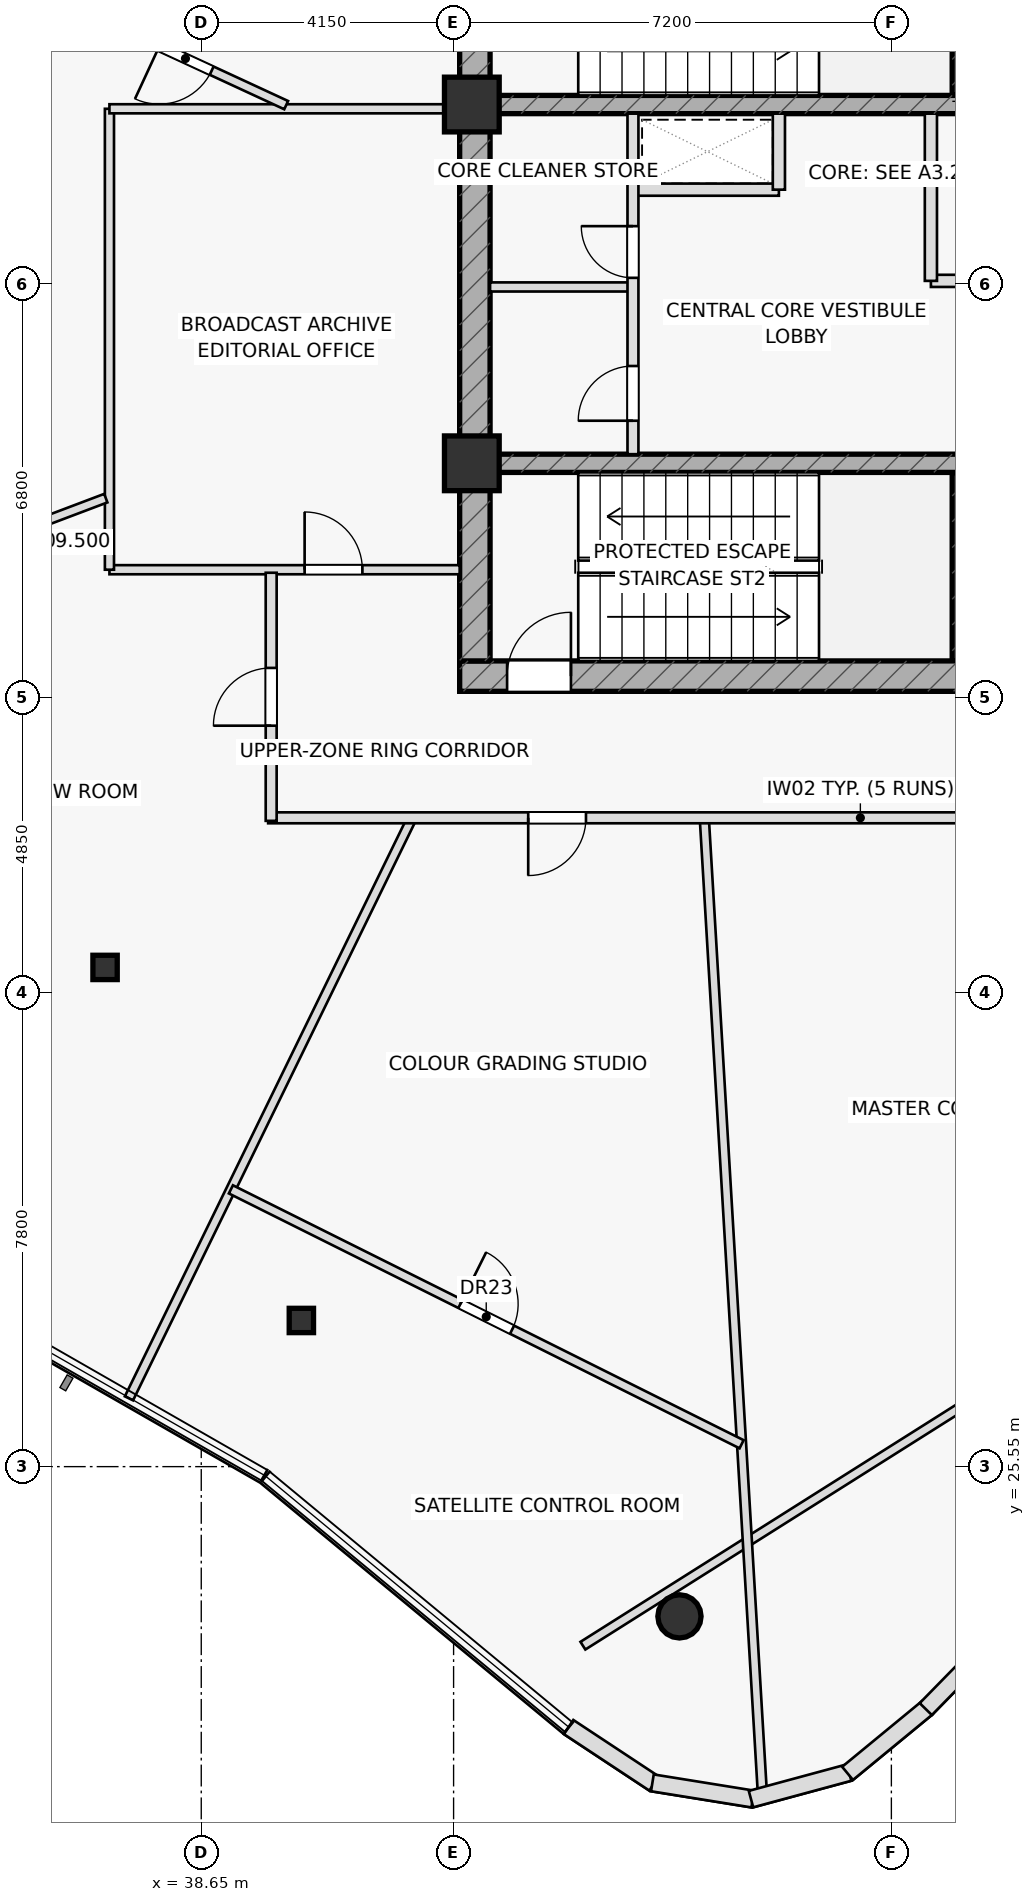
"""IFC4 building model, lengths in metres.
Left out: names, types, materials, properties, quantities, classifications, styles, units other than length and angle.
Written with IfcOpenShell. Run it as: python <this file> out.ifc"""

import sys

from ifc_helpers import new_model, si_unit, direction, frame, frame_2d, origin, origin_2d, place, context, subcontext, project, spatial, rectangle, hollow_rectangle, hollow_circle, extrude, element, fill, save


model = new_model("IFC4")
c1 = context("Model", 3, precision=1e-05, world=origin(), true_north=direction((0.0, 1.0)))
c2 = subcontext(c1, "Body", "Model", "MODEL_VIEW")
j1 = project(units=[si_unit("LENGTHUNIT", "METRE"), si_unit("PLANEANGLEUNIT", "RADIAN")], contexts=[c1])
p1 = place(None, origin())
s1 = spatial("IfcSite", under=j1, at=p1, CompositionType="ELEMENT")
p2 = place(p1, origin())
s2 = spatial("IfcBuilding", under=s1, at=p2, CompositionType="ELEMENT")
p3 = place(p2, frame((0.0, 0.0, 309.5)))
s3 = spatial("IfcBuildingStorey", under=s2, at=p3, CompositionType="ELEMENT", Elevation=309.5)
for number, where, z_axis, x_axis in (
    (1, (51.11, 48.1, 0.0), (0.0, 0.0, 1.0), (0.0, 1.0, 0.0)),
    (2, (51.11, 38.8, 0.0), (0.0, 0.0, 1.0), (0.0, 1.0, 0.0)),
):
    element("IfcWall", number, at=place(p3, frame(where, z_axis=z_axis, x_axis=x_axis)), inside=s3, PredefinedType="SHEAR", context=c2, shape_type="SweptSolid", body=[
        extrude(rectangle(XDim=3.1, YDim=0.22, at=frame_2d((1.55, 0.0))), origin(), (0.0, 0.0, 1.0), 3.7),
    ])
p4 = place(p3, frame((42.9, 38.55, 0.0), z_axis=(0.0, 0.0, 1.0), x_axis=(1.0, 0.0, 0.0)))
e3 = element("IfcWall", 3, at=p4, inside=s3, PredefinedType="SHEAR", context=c2, shape_type="SweptSolid", body=[
    extrude(rectangle(XDim=14.2, YDim=0.5, at=frame_2d((7.1, 0.0))), origin(), (0.0, 0.0, 1.0), 3.7),
])
p5 = place(p4, frame((0.78, 0.0, 0.0)))
e4 = element("IfcOpeningElement", 4, at=p5, cuts=e3, PredefinedType="OPENING", context=c2, shape_type="SweptSolid", body=[
    extrude(rectangle(XDim=1.05, YDim=2.2, at=frame_2d((0.525, 1.1))), frame((0.0, 0.26, 0.0), z_axis=(0.0, -1.0, 0.0), x_axis=(1.0, 0.0, 0.0)), (0.0, 0.0, 1.0), 0.52),
])
p6 = place(p3, frame((43.15, 38.8, 0.0), z_axis=(0.0, 0.0, 1.0), x_axis=(0.0, 1.0, 0.0)))
e5 = element("IfcWall", 5, at=p6, inside=s3, PredefinedType="SHEAR", context=c2, shape_type="SweptSolid", body=[
    extrude(rectangle(XDim=12.4, YDim=0.5, at=frame_2d((6.2, 0.0))), origin(), (0.0, 0.0, 1.0), 3.7),
])
p7 = place(p3, frame((43.4, 47.95, 0.0), z_axis=(0.0, 0.0, 1.0), x_axis=(1.0, 0.0, 0.0)))
e6 = element("IfcWall", 6, at=p7, inside=s3, PredefinedType="SHEAR", context=c2, shape_type="SweptSolid", body=[
    extrude(rectangle(XDim=13.2, YDim=0.3, at=frame_2d((6.6, 0.0))), origin(), (0.0, 0.0, 1.0), 3.7),
])
p8 = place(p7, frame((8.345, 0.0, 0.0)))
e7 = element("IfcOpeningElement", 7, at=p8, cuts=e6, PredefinedType="OPENING", context=c2, shape_type="SweptSolid", body=[
    extrude(rectangle(XDim=1.15, YDim=2.2, at=frame_2d((0.575, 1.1))), frame((0.0, 0.16, 0.0), z_axis=(0.0, -1.0, 0.0), x_axis=(1.0, 0.0, 0.0)), (0.0, 0.0, 1.0), 0.32),
])
p9 = place(p7, frame((10.065, 0.0, 0.0)))
e8 = element("IfcOpeningElement", 8, at=p9, cuts=e6, PredefinedType="OPENING", context=c2, shape_type="SweptSolid", body=[
    extrude(rectangle(XDim=1.15, YDim=2.2, at=frame_2d((0.575, 1.1))), frame((0.0, 0.16, 0.0), z_axis=(0.0, -1.0, 0.0), x_axis=(1.0, 0.0, 0.0)), (0.0, 0.0, 1.0), 0.32),
])
p10 = place(p7, frame((11.645, 0.0, 0.0)))
e9 = element("IfcOpeningElement", 9, at=p10, cuts=e6, PredefinedType="OPENING", context=c2, shape_type="SweptSolid", body=[
    extrude(rectangle(XDim=1.15, YDim=2.2, at=frame_2d((0.575, 1.1))), frame((0.0, 0.16, 0.0), z_axis=(0.0, -1.0, 0.0), x_axis=(1.0, 0.0, 0.0)), (0.0, 0.0, 1.0), 0.32),
])
p11 = place(p3, frame((43.4, 42.05, 0.0), z_axis=(0.0, 0.0, 1.0), x_axis=(1.0, 0.0, 0.0)))
e10 = element("IfcWall", 10, at=p11, inside=s3, PredefinedType="SHEAR", context=c2, shape_type="SweptSolid", body=[
    extrude(rectangle(XDim=13.2, YDim=0.3, at=frame_2d((6.6, 0.0))), origin(), (0.0, 0.0, 1.0), 3.7),
])
p12 = place(p11, frame((9.1, 0.0, 0.0)))
e11 = element("IfcOpeningElement", 11, at=p12, cuts=e10, PredefinedType="OPENING", context=c2, shape_type="SweptSolid", body=[
    extrude(rectangle(XDim=1.5, YDim=2.2, at=frame_2d((0.75, 1.1))), frame((0.0, 0.16, 0.0), z_axis=(0.0, -1.0, 0.0), x_axis=(1.0, 0.0, 0.0)), (0.0, 0.0, 1.0), 0.32),
])
for number, where, z_axis, x_axis in (
    (12, (43.1, 47.95, 0.0), (0.0, 0.0, 1.0), (1.0, 0.0, 0.0)),
    (13, (43.1, 42.05, 0.0), (0.0, 0.0, 1.0), (1.0, 0.0, 0.0)),
):
    element("IfcColumn", number, at=place(p3, frame(where, z_axis=z_axis, x_axis=x_axis)), inside=s3, PredefinedType="COLUMN", context=c2, shape_type="SweptSolid", body=[
        extrude(rectangle(XDim=0.9, YDim=0.9, at=origin_2d()), origin(), (0.0, 0.0, 1.0), 3.7),
    ])
for number, where, z_axis, x_axis in (
    (14, (37.068, 33.76, 0.0), (0.0, 0.0, 1.0), (1.0, 0.0, 0.0)),
    (15, (40.296, 27.954, 0.0), (0.0, 0.0, 1.0), (1.0, 0.0, 0.0)),
):
    element("IfcColumn", number, at=place(p3, frame(where, z_axis=z_axis, x_axis=x_axis)), inside=s3, PredefinedType="COLUMN", context=c2, shape_type="SweptSolid", body=[
        extrude(hollow_rectangle(XDim=0.4, YDim=0.4, WallThickness=0.025, at=origin_2d()), origin(), (0.0, 0.0, 1.0), 3.7),
    ])
p13 = place(p3, frame((46.515, 23.087, 0.0), z_axis=(0.0, 0.0, 1.0), x_axis=(1.0, 0.0, 0.0)))
e16 = element("IfcColumn", 16, at=p13, inside=s3, PredefinedType="COLUMN", context=c2, shape_type="SweptSolid", body=[
    extrude(hollow_circle(Radius=0.355, WallThickness=0.032, at=origin_2d()), origin(), (0.0, 0.0, 1.0), 3.7),
])
p14 = place(p3, frame((45.75, 46.55, 0.0), z_axis=(0.0, 0.0, 1.0), x_axis=(1.0, 0.0, 0.0)))
e17 = element("IfcWall", 17, at=p14, inside=s3, PredefinedType="PARTITIONING", context=c2, shape_type="SweptSolid", body=[
    extrude(rectangle(XDim=2.4, YDim=0.2, at=frame_2d((1.2, 0.0))), origin(), (0.0, 0.0, 1.0), 3.7),
])
p15 = place(p3, frame((48.15, 46.55, 0.0), z_axis=(0.0, 0.0, 1.0), x_axis=(0.0, 1.0, 0.0)))
e18 = element("IfcWall", 18, at=p15, inside=s3, PredefinedType="PARTITIONING", context=c2, shape_type="SweptSolid", body=[
    extrude(rectangle(XDim=1.25, YDim=0.2, at=frame_2d((0.625, 0.0))), origin(), (0.0, 0.0, 1.0), 3.7),
])
p16 = place(p3, frame((50.65, 45.05, 0.0), z_axis=(0.0, 0.0, 1.0), x_axis=(1.0, 0.0, 0.0)))
e19 = element("IfcWall", 19, at=p16, inside=s3, PredefinedType="PARTITIONING", context=c2, shape_type="SweptSolid", body=[
    extrude(rectangle(XDim=5.95, YDim=0.2, at=frame_2d((2.975, 0.0))), origin(), (0.0, 0.0, 1.0), 3.7),
])
p17 = place(p16, frame((1.35, 0.0, 0.0)))
e20 = element("IfcOpeningElement", 20, at=p17, cuts=e19, PredefinedType="OPENING", context=c2, shape_type="SweptSolid", body=[
    extrude(rectangle(XDim=1.5, YDim=2.2, at=frame_2d((0.75, 1.1))), frame((0.0, 0.11, 0.0), z_axis=(0.0, -1.0, 0.0), x_axis=(1.0, 0.0, 0.0)), (0.0, 0.0, 1.0), 0.22),
])
p18 = place(p3, frame((50.65, 45.05, 0.0), z_axis=(0.0, 0.0, 1.0), x_axis=(0.0, 1.0, 0.0)))
e21 = element("IfcWall", 21, at=p18, inside=s3, PredefinedType="PARTITIONING", context=c2, shape_type="SweptSolid", body=[
    extrude(rectangle(XDim=2.75, YDim=0.2, at=frame_2d((1.375, 0.0))), origin(), (0.0, 0.0, 1.0), 3.7),
])
p19 = place(p3, frame((43.4, 44.95, 0.0), z_axis=(0.0, 0.0, 1.0), x_axis=(1.0, 0.0, 0.0)))
e22 = element("IfcWall", 22, at=p19, inside=s3, PredefinedType="PARTITIONING", context=c2, shape_type="SweptSolid", body=[
    extrude(rectangle(XDim=2.35, YDim=0.15, at=frame_2d((1.175, 0.0))), origin(), (0.0, 0.0, 1.0), 3.7),
])
p20 = place(p3, frame((45.75, 42.2, 0.0), z_axis=(0.0, 0.0, 1.0), x_axis=(0.0, 1.0, 0.0)))
e23 = element("IfcWall", 23, at=p20, inside=s3, PredefinedType="PARTITIONING", context=c2, shape_type="SweptSolid", body=[
    extrude(rectangle(XDim=5.6, YDim=0.18, at=frame_2d((2.8, 0.0))), origin(), (0.0, 0.0, 1.0), 3.7),
])
p21 = place(p20, frame((0.55, 0.0, 0.0)))
e24 = element("IfcOpeningElement", 24, at=p21, cuts=e23, PredefinedType="OPENING", context=c2, shape_type="SweptSolid", body=[
    extrude(rectangle(XDim=0.9, YDim=2.05, at=frame_2d((0.45, 1.025))), frame((0.0, 0.1, 0.0), z_axis=(0.0, -1.0, 0.0), x_axis=(1.0, 0.0, 0.0)), (0.0, 0.0, 1.0), 0.2),
])
p22 = place(p20, frame((2.9, 0.0, 0.0)))
e25 = element("IfcOpeningElement", 25, at=p22, cuts=e23, PredefinedType="OPENING", context=c2, shape_type="SweptSolid", body=[
    extrude(rectangle(XDim=0.85, YDim=2.05, at=frame_2d((0.425, 1.025))), frame((0.0, 0.1, 0.0), z_axis=(0.0, -1.0, 0.0), x_axis=(1.0, 0.0, 0.0)), (0.0, 0.0, 1.0), 0.2),
])
p23 = place(p3, frame((44.927, 22.605, 0.0), z_axis=(0.0, 0.0, 1.0), x_axis=(0.845624548895, 0.533778158326, 0.0)))
e26 = element("IfcWall", 26, at=p23, inside=s3, PredefinedType="PARTITIONING", context=c2, shape_type="SweptSolid", body=[
    extrude(rectangle(XDim=10.861, YDim=0.15, at=frame_2d((5.431, 0.0))), origin(), (0.0, 0.0, 1.0), 3.225),
])
p24 = place(p3, frame((37.14, 40.3, 0.0), z_axis=(0.0, 0.0, 1.0), x_axis=(1.0, 0.0, 0.0)))
e27 = element("IfcWall", 27, at=p24, inside=s3, PredefinedType="PARTITIONING", context=c2, shape_type="SweptSolid", body=[
    extrude(rectangle(XDim=5.76, YDim=0.15, at=frame_2d((2.88, 0.0))), origin(), (0.0, 0.0, 1.0), 3.225),
])
p25 = place(p24, frame((3.21, 0.0, 0.0)))
e28 = element("IfcOpeningElement", 28, at=p25, cuts=e27, PredefinedType="OPENING", context=c2, shape_type="SweptSolid", body=[
    extrude(rectangle(XDim=0.95, YDim=2.05, at=frame_2d((0.475, 1.025))), frame((0.0, 0.085, 0.0), z_axis=(0.0, -1.0, 0.0), x_axis=(1.0, 0.0, 0.0)), (0.0, 0.0, 1.0), 0.17),
])
p26 = place(p3, frame((37.14, 40.3, 0.0), z_axis=(0.0, 0.0, 1.0), x_axis=(0.0, 1.0, 0.0)))
e29 = element("IfcWall", 29, at=p26, inside=s3, PredefinedType="PARTITIONING", context=c2, shape_type="SweptSolid", body=[
    extrude(rectangle(XDim=7.58, YDim=0.15, at=frame_2d((3.79, 0.0))), origin(), (0.0, 0.0, 1.0), 3.7),
])
p27 = place(p3, frame((37.14, 47.88, 0.0), z_axis=(0.0, 0.0, 1.0), x_axis=(1.0, 0.0, 0.0)))
e30 = element("IfcWall", 30, at=p27, inside=s3, PredefinedType="PARTITIONING", context=c2, shape_type="SweptSolid", body=[
    extrude(rectangle(XDim=5.76, YDim=0.15, at=frame_2d((2.88, 0.0))), origin(), (0.0, 0.0, 1.0), 3.7),
])
p28 = place(p3, frame((42.118, 36.22, 0.0), z_axis=(0.0, 0.0, 1.0), x_axis=(-0.438366122434, -0.898796496823, 0.0)))
e31 = element("IfcWall", 31, at=p28, inside=s3, PredefinedType="PARTITIONING", context=c2, shape_type="SweptSolid", body=[
    extrude(rectangle(XDim=10.622, YDim=0.15, at=frame_2d((5.311, 0.0))), origin(), (0.0, 0.0, 1.0), 3.275),
])
p29 = place(p3, frame((46.923, 36.22, 0.0), z_axis=(0.0, 0.0, 1.0), x_axis=(0.05944180944, -0.998231772331, 0.0)))
e32 = element("IfcWall", 32, at=p29, inside=s3, PredefinedType="PARTITIONING", context=c2, shape_type="SweptSolid", body=[
    extrude(rectangle(XDim=16.125, YDim=0.15, at=frame_2d((8.062, 0.0))), origin(), (0.0, 0.0, 1.0), 3.275),
])
p30 = place(p3, frame((40.046, 47.94, 0.0), z_axis=(0.0, 0.0, 1.0), x_axis=(-0.907540405204, 0.419964775811, 0.0)))
e33 = element("IfcWall", 33, at=p30, inside=s3, PredefinedType="PARTITIONING", context=c2, shape_type="SweptSolid", body=[
    extrude(rectangle(XDim=17.773, YDim=0.15, at=frame_2d((8.887, 0.0))), origin(), (0.0, 0.0, 1.0), 3.225),
])
p31 = place(p30, frame((1.35, 0.0, 0.0)))
e34 = element("IfcOpeningElement", 34, at=p31, cuts=e33, PredefinedType="OPENING", context=c2, shape_type="SweptSolid", body=[
    extrude(rectangle(XDim=0.95, YDim=2.05, at=frame_2d((0.475, 1.025))), frame((0.0, 0.085, 0.0), z_axis=(0.0, -1.0, 0.0), x_axis=(1.0, 0.0, 0.0)), (0.0, 0.0, 1.0), 0.17),
])
p32 = place(p3, frame((37.08, 41.477, 0.0), z_axis=(0.0, 0.0, 1.0), x_axis=(-0.935398018186, -0.353596588747, 0.0)))
e35 = element("IfcWall", 35, at=p32, inside=s3, PredefinedType="PARTITIONING", context=c2, shape_type="SweptSolid", body=[
    extrude(rectangle(XDim=10.197, YDim=0.15, at=frame_2d((5.098, 0.0))), origin(), (0.0, 0.0, 1.0), 3.275),
])
p33 = place(p3, frame((39.137, 30.11, 0.0), z_axis=(0.0, 0.0, 1.0), x_axis=(0.894770249546, -0.446526819493, 0.0)))
e36 = element("IfcWall", 36, at=p33, inside=s3, PredefinedType="PARTITIONING", context=c2, shape_type="SweptSolid", body=[
    extrude(rectangle(XDim=9.387, YDim=0.15, at=frame_2d((4.693, 0.0))), origin(), (0.0, 0.0, 1.0), 3.7),
])
p34 = place(p33, frame((4.218, 0.0, 0.0)))
e37 = element("IfcOpeningElement", 37, at=p34, cuts=e36, PredefinedType="OPENING", context=c2, shape_type="SweptSolid", body=[
    extrude(rectangle(XDim=0.95, YDim=2.05, at=frame_2d((0.475, 1.025))), frame((0.0, 0.085, 0.0), z_axis=(0.0, -1.0, 0.0), x_axis=(1.0, 0.0, 0.0)), (0.0, 0.0, 1.0), 0.17),
])
p35 = place(p3, frame((59.23, 36.22, 0.0), z_axis=(0.0, 0.0, 1.0), x_axis=(-1.0, 0.0, 0.0)))
e38 = element("IfcWall", 38, at=p35, inside=s3, PredefinedType="PARTITIONING", context=c2, shape_type="SweptSolid", body=[
    extrude(rectangle(XDim=19.48, YDim=0.18, at=frame_2d((9.74, 0.0))), origin(), (0.0, 0.0, 1.0), 3.225),
])
p36 = place(p35, frame((5.793, 0.0, 0.0)))
e39 = element("IfcOpeningElement", 39, at=p36, cuts=e38, PredefinedType="OPENING", context=c2, shape_type="SweptSolid", body=[
    extrude(rectangle(XDim=0.95, YDim=2.05, at=frame_2d((0.475, 1.025))), frame((0.0, 0.1, 0.0), z_axis=(0.0, -1.0, 0.0), x_axis=(1.0, 0.0, 0.0)), (0.0, 0.0, 1.0), 0.2),
])
p37 = place(p35, frame((14.253, 0.0, 0.0)))
e40 = element("IfcOpeningElement", 40, at=p37, cuts=e38, PredefinedType="OPENING", context=c2, shape_type="SweptSolid", body=[
    extrude(rectangle(XDim=0.95, YDim=2.05, at=frame_2d((0.475, 1.025))), frame((0.0, 0.1, 0.0), z_axis=(0.0, -1.0, 0.0), x_axis=(1.0, 0.0, 0.0)), (0.0, 0.0, 1.0), 0.2),
])
p38 = place(p3, frame((39.8, 36.17, 0.0), z_axis=(0.0, 0.0, 1.0), x_axis=(0.0, 1.0, 0.0)))
e41 = element("IfcWall", 41, at=p38, inside=s3, PredefinedType="PARTITIONING", context=c2, shape_type="SweptSolid", body=[
    extrude(rectangle(XDim=4.08, YDim=0.18, at=frame_2d((2.04, 0.0))), origin(), (0.0, 0.0, 1.0), 3.475),
])
p39 = place(p38, frame((1.565, 0.0, 0.0)))
e42 = element("IfcOpeningElement", 42, at=p39, cuts=e41, PredefinedType="OPENING", context=c2, shape_type="SweptSolid", body=[
    extrude(rectangle(XDim=0.95, YDim=2.05, at=frame_2d((0.475, 1.025))), frame((0.0, 0.1, 0.0), z_axis=(0.0, -1.0, 0.0), x_axis=(1.0, 0.0, 0.0)), (0.0, 0.0, 1.0), 0.2),
])
p40 = place(p3, frame((44.692, 21.267, 0.0), z_axis=(0.0, 0.0, 1.0), x_axis=(0.834318647921, -0.551282499026, 0.0)))
e43 = element("IfcWall", 43, at=p40, inside=s3, PredefinedType="STANDARD", context=c2, shape_type="SweptSolid", body=[
    extrude(rectangle(XDim=1.684, YDim=0.28, at=frame_2d((0.842, 0.0))), origin(), (0.0, 0.0, 1.0), 3.7),
])
p41 = place(p3, frame((46.07, 20.35, 0.0), z_axis=(0.0, 0.0, 1.0), x_axis=(0.987278852602, -0.158998324532, 0.0)))
e44 = element("IfcWall", 44, at=p41, inside=s3, PredefinedType="STANDARD", context=c2, shape_type="SweptSolid", body=[
    extrude(rectangle(XDim=1.672, YDim=0.28, at=frame_2d((0.836, 0.0))), origin(), (0.0, 0.0, 1.0), 3.7),
])
p42 = place(p3, frame((47.691, 20.083, 0.0), z_axis=(0.0, 0.0, 1.0), x_axis=(0.965290807551, 0.261177443241, 0.0)))
e45 = element("IfcWall", 45, at=p42, inside=s3, PredefinedType="STANDARD", context=c2, shape_type="SweptSolid", body=[
    extrude(rectangle(XDim=1.672, YDim=0.28, at=frame_2d((0.836, 0.0))), origin(), (0.0, 0.0, 1.0), 3.7),
])
p43 = place(p3, frame((49.279, 20.506, 0.0), z_axis=(0.0, 0.0, 1.0), x_axis=(0.77215058303, 0.635439593609, 0.0)))
e46 = element("IfcWall", 46, at=p43, inside=s3, PredefinedType="STANDARD", context=c2, shape_type="SweptSolid", body=[
    extrude(rectangle(XDim=1.695, YDim=0.28, at=frame_2d((0.847, 0.0))), origin(), (0.0, 0.0, 1.0), 3.7),
])
p44 = place(p3, frame((50.566, 21.562, 0.0), z_axis=(0.0, 0.0, 1.0), x_axis=(0.699363672828, 0.714766012852, 0.0)))
e47 = element("IfcWall", 47, at=p44, inside=s3, PredefinedType="STANDARD", context=c2, shape_type="SweptSolid", body=[
    extrude(rectangle(XDim=6.515, YDim=0.28, at=frame_2d((3.257, 0.0))), origin(), (0.0, 0.0, 1.0), 3.7),
])
p45 = place(p5, origin())
e48 = element("IfcDoor", 48, at=p45, inside=s3, OperationType="SINGLE_SWING_RIGHT", PredefinedType="DOOR", context=c2, shape_type="SweptSolid", body=[
    extrude(rectangle(XDim=1.05, YDim=2.2, at=frame_2d((0.525, 1.1))), frame((0.0, 0.025, 0.0), z_axis=(0.0, -1.0, 0.0), x_axis=(1.0, 0.0, 0.0)), (0.0, 0.0, 1.0), 0.05),
])
fill(e4, e48)
p46 = place(p21, origin())
e49 = element("IfcDoor", 49, at=p46, inside=s3, OperationType="SINGLE_SWING_LEFT", PredefinedType="DOOR", context=c2, shape_type="SweptSolid", body=[
    extrude(rectangle(XDim=0.9, YDim=2.05, at=frame_2d((0.45, 1.025))), frame((0.0, 0.025, 0.0), z_axis=(0.0, -1.0, 0.0), x_axis=(1.0, 0.0, 0.0)), (0.0, 0.0, 1.0), 0.05),
])
fill(e24, e49)
p47 = place(p22, origin())
e50 = element("IfcDoor", 50, at=p47, inside=s3, OperationType="SINGLE_SWING_RIGHT", PredefinedType="DOOR", context=c2, shape_type="SweptSolid", body=[
    extrude(rectangle(XDim=0.85, YDim=2.05, at=frame_2d((0.425, 1.025))), frame((0.0, 0.025, 0.0), z_axis=(0.0, -1.0, 0.0), x_axis=(1.0, 0.0, 0.0)), (0.0, 0.0, 1.0), 0.05),
])
fill(e25, e50)
p48 = place(p25, origin())
e51 = element("IfcDoor", 51, at=p48, inside=s3, OperationType="SINGLE_SWING_LEFT", PredefinedType="DOOR", context=c2, shape_type="SweptSolid", body=[
    extrude(rectangle(XDim=0.95, YDim=2.05, at=frame_2d((0.475, 1.025))), frame((0.0, 0.025, 0.0), z_axis=(0.0, -1.0, 0.0), x_axis=(1.0, 0.0, 0.0)), (0.0, 0.0, 1.0), 0.05),
])
fill(e28, e51)
p49 = place(p31, origin())
e52 = element("IfcDoor", 52, at=p49, inside=s3, OperationType="SINGLE_SWING_RIGHT", PredefinedType="DOOR", context=c2, shape_type="SweptSolid", body=[
    extrude(rectangle(XDim=0.95, YDim=2.05, at=frame_2d((0.475, 1.025))), frame((0.0, 0.025, 0.0), z_axis=(0.0, -1.0, 0.0), x_axis=(1.0, 0.0, 0.0)), (0.0, 0.0, 1.0), 0.05),
])
fill(e34, e52)
p50 = place(p34, origin())
e53 = element("IfcDoor", 53, at=p50, inside=s3, OperationType="SINGLE_SWING_LEFT", PredefinedType="DOOR", context=c2, shape_type="SweptSolid", body=[
    extrude(rectangle(XDim=0.95, YDim=2.05, at=frame_2d((0.475, 1.025))), frame((0.0, 0.025, 0.0), z_axis=(0.0, -1.0, 0.0), x_axis=(1.0, 0.0, 0.0)), (0.0, 0.0, 1.0), 0.05),
])
fill(e37, e53)
p51 = place(p37, origin())
e54 = element("IfcDoor", 54, at=p51, inside=s3, OperationType="SINGLE_SWING_RIGHT", PredefinedType="DOOR", context=c2, shape_type="SweptSolid", body=[
    extrude(rectangle(XDim=0.95, YDim=2.05, at=frame_2d((0.475, 1.025))), frame((0.0, 0.025, 0.0), z_axis=(0.0, -1.0, 0.0), x_axis=(1.0, 0.0, 0.0)), (0.0, 0.0, 1.0), 0.05),
])
fill(e40, e54)
p52 = place(p39, origin())
e55 = element("IfcDoor", 55, at=p52, inside=s3, OperationType="SINGLE_SWING_LEFT", PredefinedType="DOOR", context=c2, shape_type="SweptSolid", body=[
    extrude(rectangle(XDim=0.95, YDim=2.05, at=frame_2d((0.475, 1.025))), frame((0.0, 0.025, 0.0), z_axis=(0.0, -1.0, 0.0), x_axis=(1.0, 0.0, 0.0)), (0.0, 0.0, 1.0), 0.05),
])
fill(e42, e55)
save(model, sys.argv[1])
